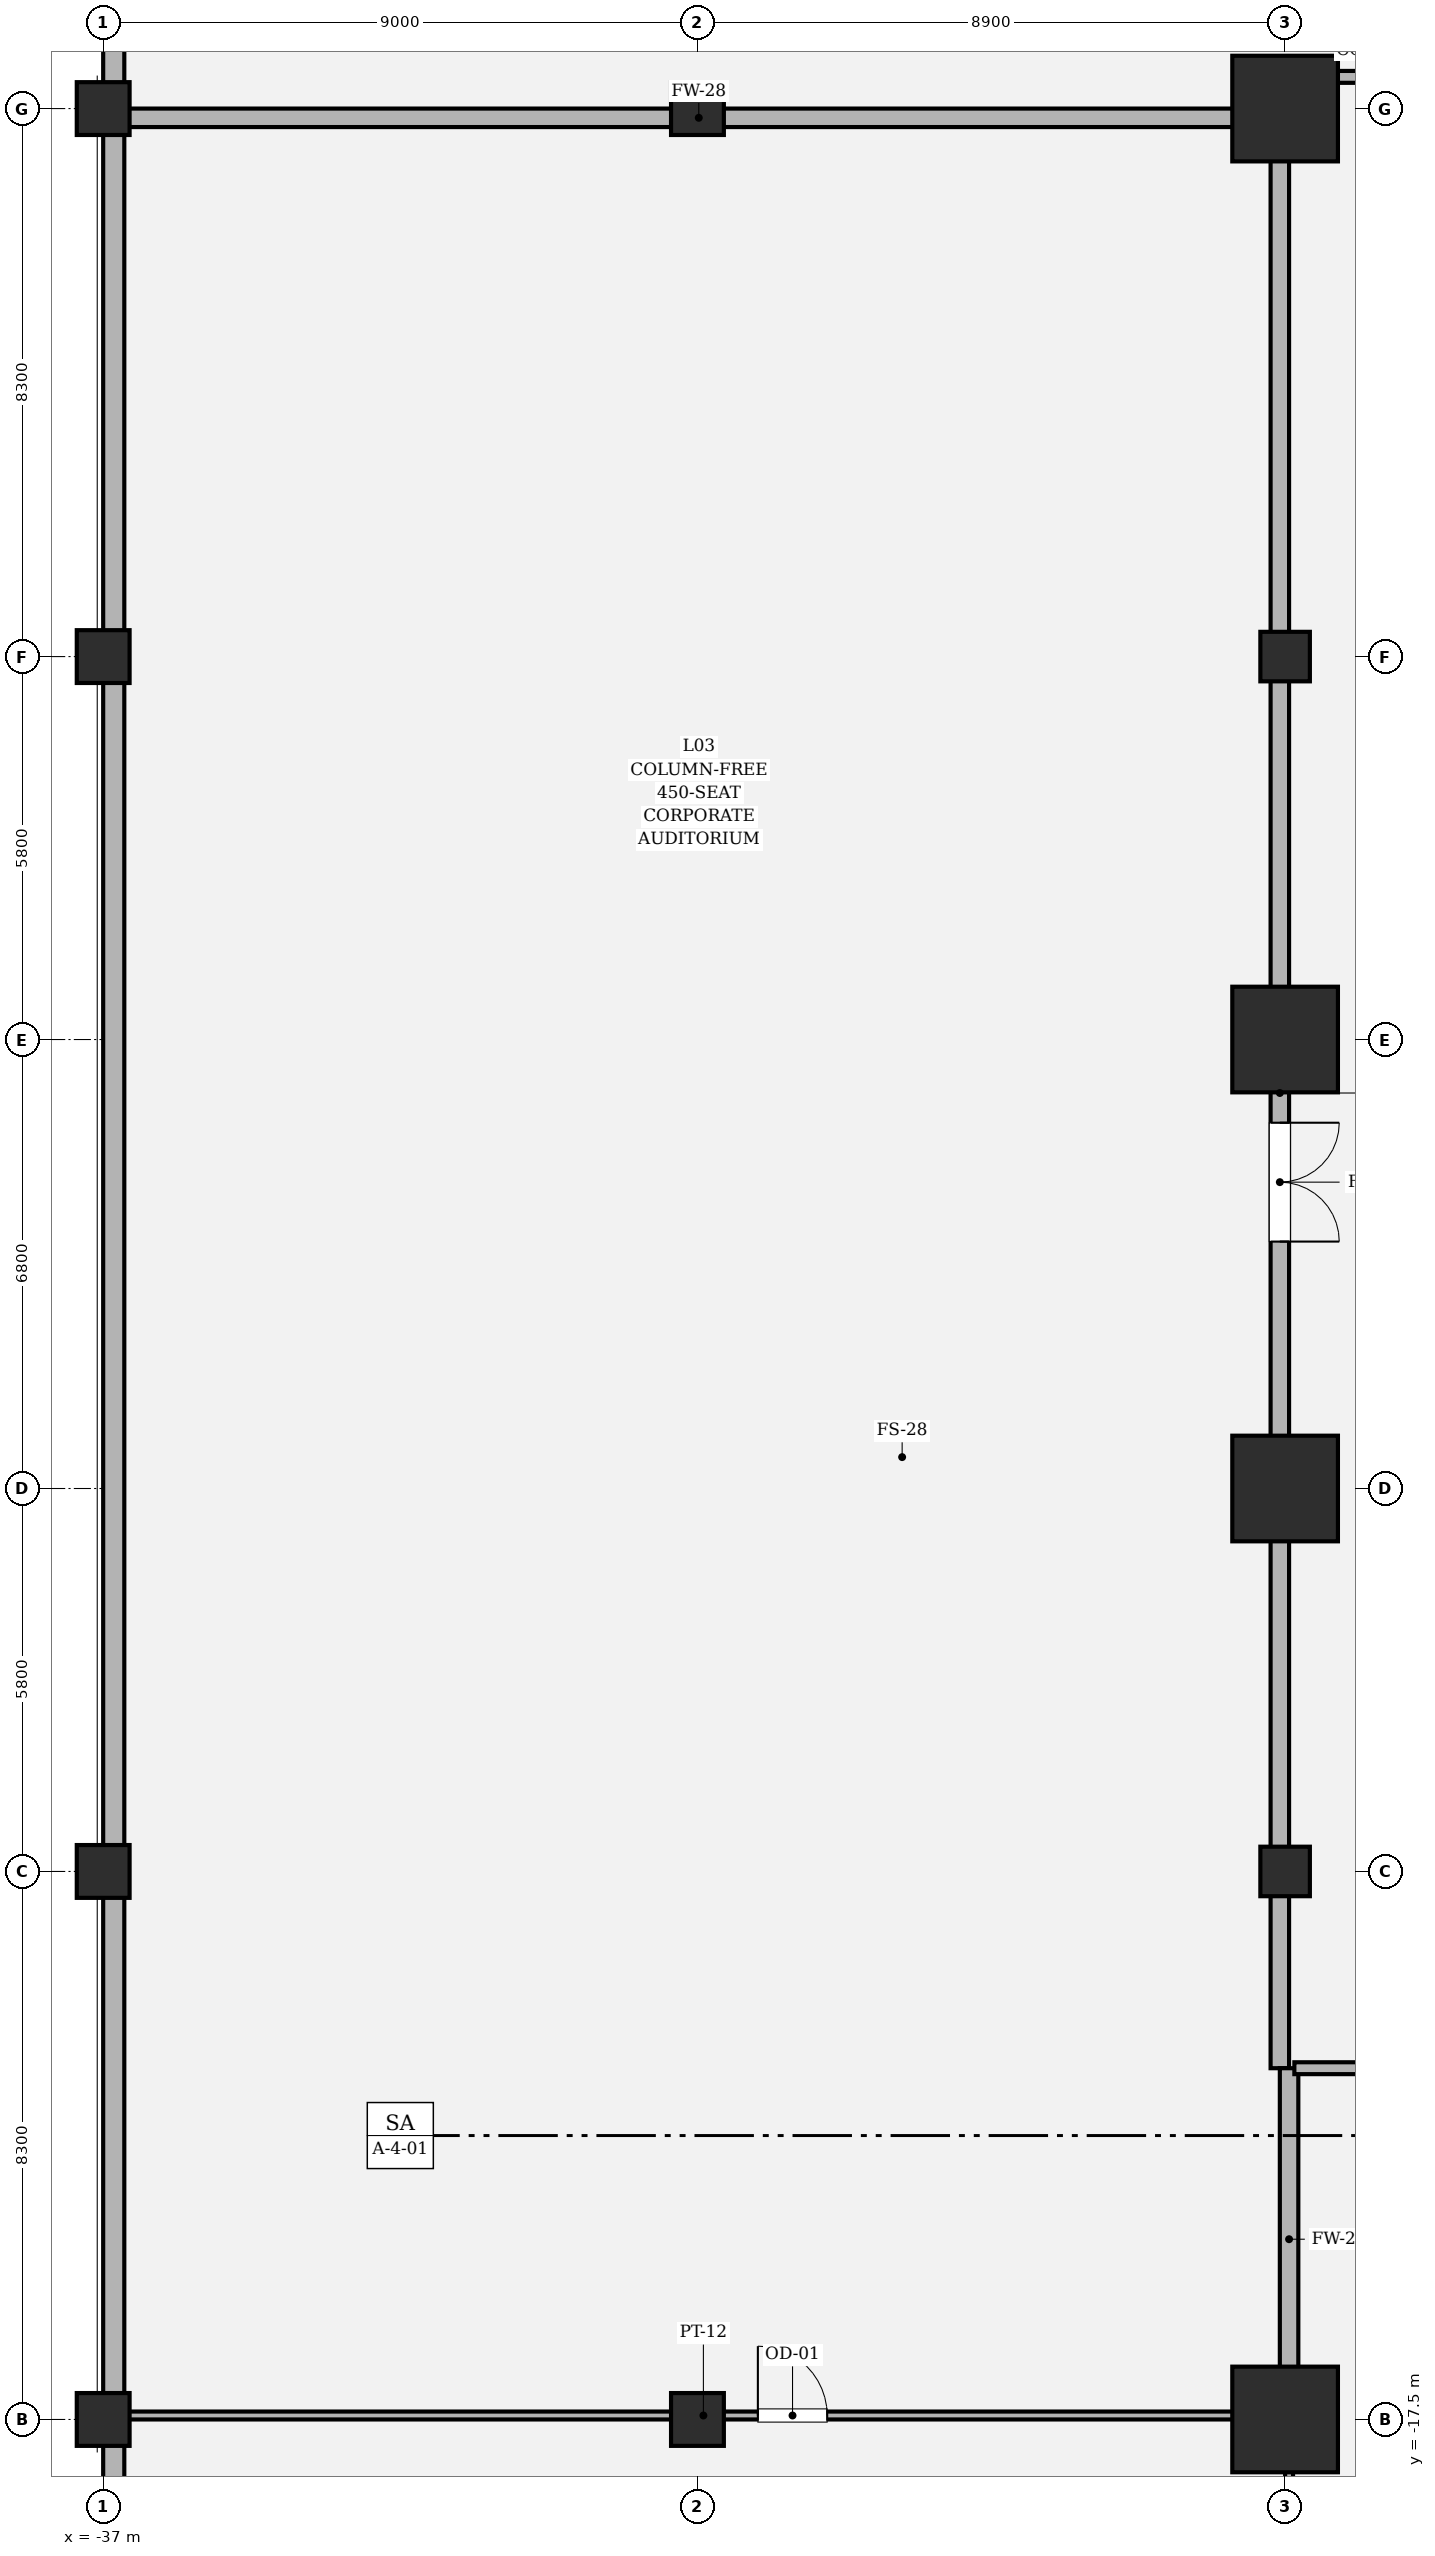
"""IFC4 building model, lengths in metres.
Left out: names, types, materials, properties, quantities, classifications, styles, units other than length and angle.
Written with IfcOpenShell. Run it as: python <this file> out.ifc"""

import sys

from ifc_helpers import new_model, si_unit, direction, frame, frame_2d, origin, origin_2d, place, context, subcontext, project, spatial, rectangle, hollow_rectangle, circle, extrude, element, fill, save


model = new_model("IFC4")
c1 = context("Model", 3, precision=1e-05, world=origin(), true_north=direction((0.0, 1.0)))
c2 = subcontext(c1, "Body", "Model", "MODEL_VIEW")
j1 = project(units=[si_unit("LENGTHUNIT", "METRE"), si_unit("PLANEANGLEUNIT", "RADIAN")], contexts=[c1])
p1 = place(None, origin())
s1 = spatial("IfcSite", under=j1, at=p1, CompositionType="ELEMENT")
p2 = place(p1, origin())
s2 = spatial("IfcBuilding", under=s1, at=p2, CompositionType="ELEMENT")
p3 = place(p2, frame((0.0, 0.0, 16.8)))
s3 = spatial("IfcBuildingStorey", under=s2, at=p3, CompositionType="ELEMENT", Elevation=16.8)
for number, where, z_axis, x_axis in (
    (1, (-19.1, -17.5, 0.0), (0.0, 0.0, 1.0), (1.0, 0.0, 0.0)),
    (2, (-19.1, 17.5, 0.0), (0.0, 0.0, 1.0), (1.0, 0.0, 0.0)),
    (3, (-19.1, 3.4, 0.0), (0.0, 0.0, 1.0), (1.0, 0.0, 0.0)),
    (4, (-19.1, -3.4, 0.0), (0.0, 0.0, 1.0), (1.0, 0.0, 0.0)),
):
    element("IfcColumn", number, at=place(p3, frame(where, z_axis=z_axis, x_axis=x_axis)), inside=s3, PredefinedType="COLUMN", context=c2, shape_type="SweptSolid", body=[
        extrude(hollow_rectangle(XDim=1.6, YDim=1.6, WallThickness=0.05, at=origin_2d()), origin(), (0.0, 0.0, 1.0), 5.4),
    ])
for number, where, z_axis, x_axis in (
    (5, (-37.0, -17.5, 0.0), (0.0, 0.0, 1.0), (1.0, 0.0, 0.0)),
    (6, (-28.0, -17.5, 0.0), (0.0, 0.0, 1.0), (1.0, 0.0, 0.0)),
    (7, (-37.0, -9.2, 0.0), (0.0, 0.0, 1.0), (1.0, 0.0, 0.0)),
    (8, (-37.0, 9.2, 0.0), (0.0, 0.0, 1.0), (1.0, 0.0, 0.0)),
    (9, (-37.0, 17.5, 0.0), (0.0, 0.0, 1.0), (1.0, 0.0, 0.0)),
    (10, (-28.0, 17.5, 0.0), (0.0, 0.0, 1.0), (1.0, 0.0, 0.0)),
):
    element("IfcColumn", number, at=place(p3, frame(where, z_axis=z_axis, x_axis=x_axis)), inside=s3, PredefinedType="COLUMN", context=c2, shape_type="SweptSolid", body=[
        extrude(rectangle(XDim=0.8, YDim=0.8, at=origin_2d()), origin(), (0.0, 0.0, 1.0), 5.4),
    ])
for number, where, z_axis, x_axis in (
    (11, (-19.1, -9.2, 0.0), (0.0, 0.0, 1.0), (1.0, 0.0, 0.0)),
    (12, (-19.1, 9.2, 0.0), (0.0, 0.0, 1.0), (1.0, 0.0, 0.0)),
):
    element("IfcColumn", number, at=place(p3, frame(where, z_axis=z_axis, x_axis=x_axis)), inside=s3, PredefinedType="PILASTER", context=c2, shape_type="SweptSolid", body=[
        extrude(circle(Radius=0.375, at=origin_2d()), origin(), (0.0, 0.0, 1.0), 5.4),
    ])
p4 = place(p3, frame((-36.84, -22.2, 0.0), z_axis=(0.0, 0.0, 1.0), x_axis=(0.0, 1.0, 0.0)))
e13 = element("IfcWall", 13, at=p4, inside=s3, PredefinedType="SOLIDWALL", context=c2, shape_type="SweptSolid", body=[
    extrude(rectangle(XDim=44.4, YDim=0.32, at=frame_2d((22.2, 0.0))), origin(), (0.0, 0.0, 1.0), 3.164),
])
p5 = place(p3, frame((-36.78, -17.44, 0.0), z_axis=(0.0, 0.0, 1.0), x_axis=(1.0, 0.0, 0.0)))
e14 = element("IfcWall", 14, at=p5, inside=s3, PredefinedType="PARTITIONING", context=c2, shape_type="SweptSolid", body=[
    extrude(rectangle(XDim=17.74, YDim=0.12, at=frame_2d((8.87, 0.0))), origin(), (0.0, 0.0, 1.0), 3.164),
])
p6 = place(p5, frame((9.695, 0.0, 0.0)))
e15 = element("IfcOpeningElement", 15, at=p6, cuts=e14, PredefinedType="OPENING", context=c2, shape_type="SweptSolid", body=[
    extrude(rectangle(XDim=1.05, YDim=2.2, at=frame_2d((0.525, 1.1))), frame((0.0, 0.07, 0.0), z_axis=(0.0, -1.0, 0.0), x_axis=(1.0, 0.0, 0.0)), (0.0, 0.0, 1.0), 0.14),
])
p7 = place(p3, frame((-19.04, -17.44, 0.0), z_axis=(0.0, 0.0, 1.0), x_axis=(0.0, -1.0, 0.0)))
e16 = element("IfcWall", 16, at=p7, inside=s3, PredefinedType="PARTITIONING", context=c2, shape_type="SweptSolid", body=[
    extrude(rectangle(XDim=7.34, YDim=0.12, at=frame_2d((3.67, 0.0))), origin(), (0.0, 0.0, 1.0), 3.164),
])
p8 = place(p3, frame((-36.78, 17.36, 0.0), z_axis=(0.0, 0.0, 1.0), x_axis=(1.0, 0.0, 0.0)))
e17 = element("IfcWall", 17, at=p8, inside=s3, PredefinedType="SOLIDWALL", context=c2, shape_type="SweptSolid", body=[
    extrude(rectangle(XDim=17.6, YDim=0.28, at=frame_2d((8.8, 0.0))), origin(), (0.0, 0.0, 1.0), 3.164),
])
p9 = place(p3, frame((-19.18, 17.36, 0.0), z_axis=(0.0, 0.0, 1.0), x_axis=(0.0, -1.0, 0.0)))
e18 = element("IfcWall", 18, at=p9, inside=s3, PredefinedType="SOLIDWALL", context=c2, shape_type="SweptSolid", body=[
    extrude(rectangle(XDim=29.54, YDim=0.28, at=frame_2d((14.77, 0.0))), origin(), (0.0, 0.0, 1.0), 3.164),
])
p10 = place(p9, frame((15.22, 0.0, 0.0)))
e19 = element("IfcOpeningElement", 19, at=p10, cuts=e18, PredefinedType="OPENING", context=c2, shape_type="SweptSolid", body=[
    extrude(rectangle(XDim=1.8, YDim=2.35, at=frame_2d((0.9, 1.175))), frame((0.0, 0.15, 0.0), z_axis=(0.0, -1.0, 0.0), x_axis=(1.0, 0.0, 0.0)), (0.0, 0.0, 1.0), 0.3),
])
p11 = place(p3, frame((-19.04, -12.18, 0.0), z_axis=(0.0, 0.0, 1.0), x_axis=(0.0, -1.0, 0.0)))
e20 = element("IfcWall", 20, at=p11, inside=s3, PredefinedType="SOLIDWALL", context=c2, shape_type="SweptSolid", body=[
    extrude(rectangle(XDim=5.18, YDim=0.28, at=frame_2d((2.59, 0.0))), origin(), (0.0, 0.0, 1.0), 3.164),
])
p12 = place(p3, frame((-16.46, 17.98, 0.0), z_axis=(0.0, 0.0, 1.0), x_axis=(-1.0, 0.0, 0.0)))
e21 = element("IfcWall", 21, at=p12, inside=s3, PredefinedType="PARTITIONING", context=c2, shape_type="SweptSolid", body=[
    extrude(rectangle(XDim=2.72, YDim=0.18, at=frame_2d((1.36, 0.0))), origin(), (0.0, 0.0, 1.0), 4.314),
])
p13 = place(p3, frame((-18.96, -12.18, 0.0), z_axis=(0.0, 0.0, 1.0), x_axis=(1.0, 0.0, 0.0)))
e22 = element("IfcWall", 22, at=p13, inside=s3, PredefinedType="PARTITIONING", context=c2, shape_type="SweptSolid", body=[
    extrude(rectangle(XDim=37.92, YDim=0.18, at=frame_2d((18.96, 0.0))), origin(), (0.0, 0.0, 1.0), 4.314),
])
p14 = place(p13, frame((18.435, 0.0, 0.0)))
e23 = element("IfcOpeningElement", 23, at=p14, cuts=e22, PredefinedType="OPENING", context=c2, shape_type="SweptSolid", body=[
    extrude(rectangle(XDim=1.05, YDim=2.2, at=frame_2d((0.525, 1.1))), frame((0.0, 0.1, 0.0), z_axis=(0.0, -1.0, 0.0), x_axis=(1.0, 0.0, 0.0)), (0.0, 0.0, 1.0), 0.2),
])
p15 = place(p6, origin())
e24 = element("IfcDoor", 24, at=p15, inside=s3, OperationType="SINGLE_SWING_LEFT", PredefinedType="DOOR", context=c2, shape_type="SweptSolid", body=[
    extrude(rectangle(XDim=1.05, YDim=2.2, at=frame_2d((0.525, 1.1))), frame((0.0, 0.025, 0.0), z_axis=(0.0, -1.0, 0.0), x_axis=(1.0, 0.0, 0.0)), (0.0, 0.0, 1.0), 0.05),
])
fill(e15, e24)
p16 = place(p10, origin())
e25 = element("IfcDoor", 25, at=p16, inside=s3, OperationType="DOUBLE_DOOR_SINGLE_SWING", PredefinedType="DOOR", context=c2, shape_type="SweptSolid", body=[
    extrude(rectangle(XDim=1.8, YDim=2.35, at=frame_2d((0.9, 1.175))), frame((0.0, 0.025, 0.0), z_axis=(0.0, -1.0, 0.0), x_axis=(1.0, 0.0, 0.0)), (0.0, 0.0, 1.0), 0.05),
])
fill(e19, e25)
save(model, sys.argv[1])
